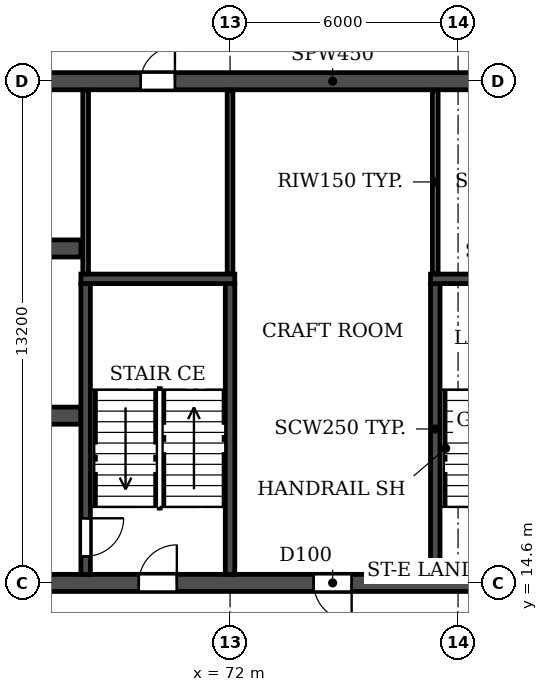
"""IFC4 building model, lengths in metres.
Left out: names, types, materials, properties, quantities, classifications, styles, units other than length and angle.
Written with IfcOpenShell. Run it as: python <this file> out.ifc"""

import sys

from ifc_helpers import new_model, si_unit, direction, frame, frame_2d, origin, place, context, subcontext, project, spatial, rectangle, extrude, element, fill, save


model = new_model("IFC4")
c1 = context("Model", 3, precision=1e-05, world=origin(), true_north=direction((0.0, 1.0)))
c2 = subcontext(c1, "Body", "Model", "MODEL_VIEW")
j1 = project(units=[si_unit("LENGTHUNIT", "METRE"), si_unit("PLANEANGLEUNIT", "RADIAN")], contexts=[c1])
p1 = place(None, origin())
s1 = spatial("IfcSite", under=j1, at=p1, CompositionType="ELEMENT")
p2 = place(p1, origin())
s2 = spatial("IfcBuilding", under=s1, at=p2, CompositionType="ELEMENT")
p3 = place(p2, frame((0.0, 0.0, 125.7)))
s3 = spatial("IfcBuildingStorey", under=s2, at=p3, CompositionType="ELEMENT", Elevation=125.7)
p4 = place(p3, frame((12.2, 14.6, 0.0), z_axis=(0.0, 0.0, 1.0), x_axis=(1.0, 0.0, 0.0)))
e1 = element("IfcWall", 1, at=p4, inside=s3, PredefinedType="SOLIDWALL", context=c2, shape_type="SweptSolid", body=[
    extrude(rectangle(XDim=77.6, YDim=0.45, at=frame_2d((38.8, 0.0))), origin(), (0.0, 0.0, 1.0), 3.07),
])
p5 = place(p4, frame((0.8, 0.0, 0.0)))
e2 = element("IfcOpeningElement", 2, at=p5, cuts=e1, PredefinedType="OPENING", context=c2, shape_type="SweptSolid", body=[
    extrude(rectangle(XDim=1.0, YDim=2.1, at=frame_2d((0.5, 1.05))), frame((0.0, 0.235, 0.0), z_axis=(0.0, -1.0, 0.0), x_axis=(1.0, 0.0, 0.0)), (0.0, 0.0, 1.0), 0.47),
])
p6 = place(p4, frame((3.8, 0.0, 0.0)))
e3 = element("IfcOpeningElement", 3, at=p6, cuts=e1, PredefinedType="OPENING", context=c2, shape_type="SweptSolid", body=[
    extrude(rectangle(XDim=1.0, YDim=2.1, at=frame_2d((0.5, 1.05))), frame((0.0, 0.235, 0.0), z_axis=(0.0, -1.0, 0.0), x_axis=(1.0, 0.0, 0.0)), (0.0, 0.0, 1.0), 0.47),
])
p7 = place(p4, frame((6.7, 0.0, 0.0)))
e4 = element("IfcOpeningElement", 4, at=p7, cuts=e1, PredefinedType="OPENING", context=c2, shape_type="SweptSolid", body=[
    extrude(rectangle(XDim=1.0, YDim=2.1, at=frame_2d((0.5, 1.05))), frame((0.0, 0.235, 0.0), z_axis=(0.0, -1.0, 0.0), x_axis=(1.0, 0.0, 0.0)), (0.0, 0.0, 1.0), 0.47),
])
p8 = place(p4, frame((14.6, 0.0, 0.0)))
e5 = element("IfcOpeningElement", 5, at=p8, cuts=e1, PredefinedType="OPENING", context=c2, shape_type="SweptSolid", body=[
    extrude(rectangle(XDim=1.0, YDim=2.1, at=frame_2d((0.5, 1.05))), frame((0.0, 0.235, 0.0), z_axis=(0.0, -1.0, 0.0), x_axis=(1.0, 0.0, 0.0)), (0.0, 0.0, 1.0), 0.47),
])
p9 = place(p4, frame((19.2, 0.0, 0.0)))
e6 = element("IfcOpeningElement", 6, at=p9, cuts=e1, PredefinedType="OPENING", context=c2, shape_type="SweptSolid", body=[
    extrude(rectangle(XDim=1.0, YDim=2.1, at=frame_2d((0.5, 1.05))), frame((0.0, 0.235, 0.0), z_axis=(0.0, -1.0, 0.0), x_axis=(1.0, 0.0, 0.0)), (0.0, 0.0, 1.0), 0.47),
])
p10 = place(p4, frame((30.5, 0.0, 0.0)))
e7 = element("IfcOpeningElement", 7, at=p10, cuts=e1, PredefinedType="OPENING", context=c2, shape_type="SweptSolid", body=[
    extrude(rectangle(XDim=1.0, YDim=2.1, at=frame_2d((0.5, 1.05))), frame((0.0, 0.235, 0.0), z_axis=(0.0, -1.0, 0.0), x_axis=(1.0, 0.0, 0.0)), (0.0, 0.0, 1.0), 0.47),
])
p11 = place(p4, frame((34.4, 0.0, 0.0)))
e8 = element("IfcOpeningElement", 8, at=p11, cuts=e1, PredefinedType="OPENING", context=c2, shape_type="SweptSolid", body=[
    extrude(rectangle(XDim=1.0, YDim=2.1, at=frame_2d((0.5, 1.05))), frame((0.0, 0.235, 0.0), z_axis=(0.0, -1.0, 0.0), x_axis=(1.0, 0.0, 0.0)), (0.0, 0.0, 1.0), 0.47),
])
p12 = place(p4, frame((38.3, 0.0, 0.0)))
e9 = element("IfcOpeningElement", 9, at=p12, cuts=e1, PredefinedType="OPENING", context=c2, shape_type="SweptSolid", body=[
    extrude(rectangle(XDim=1.0, YDim=2.1, at=frame_2d((0.5, 1.05))), frame((0.0, 0.235, 0.0), z_axis=(0.0, -1.0, 0.0), x_axis=(1.0, 0.0, 0.0)), (0.0, 0.0, 1.0), 0.47),
])
p13 = place(p4, frame((40.9, 0.0, 0.0)))
e10 = element("IfcOpeningElement", 10, at=p13, cuts=e1, PredefinedType="OPENING", context=c2, shape_type="SweptSolid", body=[
    extrude(rectangle(XDim=1.0, YDim=2.1, at=frame_2d((0.5, 1.05))), frame((0.0, 0.235, 0.0), z_axis=(0.0, -1.0, 0.0), x_axis=(1.0, 0.0, 0.0)), (0.0, 0.0, 1.0), 0.47),
])
p14 = place(p4, frame((44.8, 0.0, 0.0)))
e11 = element("IfcOpeningElement", 11, at=p14, cuts=e1, PredefinedType="OPENING", context=c2, shape_type="SweptSolid", body=[
    extrude(rectangle(XDim=1.0, YDim=2.1, at=frame_2d((0.5, 1.05))), frame((0.0, 0.235, 0.0), z_axis=(0.0, -1.0, 0.0), x_axis=(1.0, 0.0, 0.0)), (0.0, 0.0, 1.0), 0.47),
])
p15 = place(p4, frame((57.4, 0.0, 0.0)))
e12 = element("IfcOpeningElement", 12, at=p15, cuts=e1, PredefinedType="OPENING", context=c2, shape_type="SweptSolid", body=[
    extrude(rectangle(XDim=1.0, YDim=2.1, at=frame_2d((0.5, 1.05))), frame((0.0, 0.235, 0.0), z_axis=(0.0, -1.0, 0.0), x_axis=(1.0, 0.0, 0.0)), (0.0, 0.0, 1.0), 0.47),
])
p16 = place(p4, frame((62.0, 0.0, 0.0)))
e13 = element("IfcOpeningElement", 13, at=p16, cuts=e1, PredefinedType="OPENING", context=c2, shape_type="SweptSolid", body=[
    extrude(rectangle(XDim=1.0, YDim=2.1, at=frame_2d((0.5, 1.05))), frame((0.0, 0.235, 0.0), z_axis=(0.0, -1.0, 0.0), x_axis=(1.0, 0.0, 0.0)), (0.0, 0.0, 1.0), 0.47),
])
p17 = place(p4, frame((69.9, 0.0, 0.0)))
e14 = element("IfcOpeningElement", 14, at=p17, cuts=e1, PredefinedType="OPENING", context=c2, shape_type="SweptSolid", body=[
    extrude(rectangle(XDim=1.0, YDim=2.1, at=frame_2d((0.5, 1.05))), frame((0.0, 0.235, 0.0), z_axis=(0.0, -1.0, 0.0), x_axis=(1.0, 0.0, 0.0)), (0.0, 0.0, 1.0), 0.47),
])
p18 = place(p4, frame((72.8, 0.0, 0.0)))
e15 = element("IfcOpeningElement", 15, at=p18, cuts=e1, PredefinedType="OPENING", context=c2, shape_type="SweptSolid", body=[
    extrude(rectangle(XDim=1.0, YDim=2.1, at=frame_2d((0.5, 1.05))), frame((0.0, 0.235, 0.0), z_axis=(0.0, -1.0, 0.0), x_axis=(1.0, 0.0, 0.0)), (0.0, 0.0, 1.0), 0.47),
])
p19 = place(p4, frame((75.8, 0.0, 0.0)))
e16 = element("IfcOpeningElement", 16, at=p19, cuts=e1, PredefinedType="OPENING", context=c2, shape_type="SweptSolid", body=[
    extrude(rectangle(XDim=1.0, YDim=2.1, at=frame_2d((0.5, 1.05))), frame((0.0, 0.235, 0.0), z_axis=(0.0, -1.0, 0.0), x_axis=(1.0, 0.0, 0.0)), (0.0, 0.0, 1.0), 0.47),
])
p20 = place(p3, frame((12.2, 27.8, 0.0), z_axis=(0.0, 0.0, 1.0), x_axis=(1.0, 0.0, 0.0)))
e17 = element("IfcWall", 17, at=p20, inside=s3, PredefinedType="SOLIDWALL", context=c2, shape_type="SweptSolid", body=[
    extrude(rectangle(XDim=77.6, YDim=0.45, at=frame_2d((38.8, 0.0))), origin(), (0.0, 0.0, 1.0), 3.07),
])
p21 = place(p20, frame((0.8, 0.0, 0.0)))
e18 = element("IfcOpeningElement", 18, at=p21, cuts=e17, PredefinedType="OPENING", context=c2, shape_type="SweptSolid", body=[
    extrude(rectangle(XDim=1.0, YDim=2.1, at=frame_2d((0.5, 1.05))), frame((0.0, 0.235, 0.0), z_axis=(0.0, -1.0, 0.0), x_axis=(1.0, 0.0, 0.0)), (0.0, 0.0, 1.0), 0.47),
])
p22 = place(p20, frame((3.8, 0.0, 0.0)))
e19 = element("IfcOpeningElement", 19, at=p22, cuts=e17, PredefinedType="OPENING", context=c2, shape_type="SweptSolid", body=[
    extrude(rectangle(XDim=1.0, YDim=2.1, at=frame_2d((0.5, 1.05))), frame((0.0, 0.235, 0.0), z_axis=(0.0, -1.0, 0.0), x_axis=(1.0, 0.0, 0.0)), (0.0, 0.0, 1.0), 0.47),
])
p23 = place(p20, frame((6.7, 0.0, 0.0)))
e20 = element("IfcOpeningElement", 20, at=p23, cuts=e17, PredefinedType="OPENING", context=c2, shape_type="SweptSolid", body=[
    extrude(rectangle(XDim=1.0, YDim=2.1, at=frame_2d((0.5, 1.05))), frame((0.0, 0.235, 0.0), z_axis=(0.0, -1.0, 0.0), x_axis=(1.0, 0.0, 0.0)), (0.0, 0.0, 1.0), 0.47),
])
p24 = place(p20, frame((10.05, 0.0, 0.0)))
e21 = element("IfcOpeningElement", 21, at=p24, cuts=e17, PredefinedType="OPENING", context=c2, shape_type="SweptSolid", body=[
    extrude(rectangle(XDim=0.9, YDim=2.1, at=frame_2d((0.45, 1.05))), frame((0.0, 0.235, 0.0), z_axis=(0.0, -1.0, 0.0), x_axis=(1.0, 0.0, 0.0)), (0.0, 0.0, 1.0), 0.47),
])
p25 = place(p20, frame((19.25, 0.0, 0.0)))
e22 = element("IfcOpeningElement", 22, at=p25, cuts=e17, PredefinedType="OPENING", context=c2, shape_type="SweptSolid", body=[
    extrude(rectangle(XDim=0.9, YDim=2.1, at=frame_2d((0.45, 1.05))), frame((0.0, 0.235, 0.0), z_axis=(0.0, -1.0, 0.0), x_axis=(1.0, 0.0, 0.0)), (0.0, 0.0, 1.0), 0.47),
])
p26 = place(p20, frame((25.0, 0.0, 0.0)))
e23 = element("IfcOpeningElement", 23, at=p26, cuts=e17, PredefinedType="OPENING", context=c2, shape_type="SweptSolid", body=[
    extrude(rectangle(XDim=1.0, YDim=2.1, at=frame_2d((0.5, 1.05))), frame((0.0, 0.235, 0.0), z_axis=(0.0, -1.0, 0.0), x_axis=(1.0, 0.0, 0.0)), (0.0, 0.0, 1.0), 0.47),
])
p27 = place(p20, frame((30.2, 0.0, 0.0)))
e24 = element("IfcOpeningElement", 24, at=p27, cuts=e17, PredefinedType="OPENING", context=c2, shape_type="SweptSolid", body=[
    extrude(rectangle(XDim=1.0, YDim=2.1, at=frame_2d((0.5, 1.05))), frame((0.0, 0.235, 0.0), z_axis=(0.0, -1.0, 0.0), x_axis=(1.0, 0.0, 0.0)), (0.0, 0.0, 1.0), 0.47),
])
p28 = place(p20, frame((35.4, 0.0, 0.0)))
e25 = element("IfcOpeningElement", 25, at=p28, cuts=e17, PredefinedType="OPENING", context=c2, shape_type="SweptSolid", body=[
    extrude(rectangle(XDim=1.0, YDim=2.1, at=frame_2d((0.5, 1.05))), frame((0.0, 0.235, 0.0), z_axis=(0.0, -1.0, 0.0), x_axis=(1.0, 0.0, 0.0)), (0.0, 0.0, 1.0), 0.47),
])
p29 = place(p20, frame((38.3, 0.0, 0.0)))
e26 = element("IfcOpeningElement", 26, at=p29, cuts=e17, PredefinedType="OPENING", context=c2, shape_type="SweptSolid", body=[
    extrude(rectangle(XDim=1.0, YDim=2.1, at=frame_2d((0.5, 1.05))), frame((0.0, 0.235, 0.0), z_axis=(0.0, -1.0, 0.0), x_axis=(1.0, 0.0, 0.0)), (0.0, 0.0, 1.0), 0.47),
])
p30 = place(p20, frame((42.5, 0.0, 0.0)))
e27 = element("IfcOpeningElement", 27, at=p30, cuts=e17, PredefinedType="OPENING", context=c2, shape_type="SweptSolid", body=[
    extrude(rectangle(XDim=1.0, YDim=2.1, at=frame_2d((0.5, 1.05))), frame((0.0, 0.235, 0.0), z_axis=(0.0, -1.0, 0.0), x_axis=(1.0, 0.0, 0.0)), (0.0, 0.0, 1.0), 0.47),
])
p31 = place(p20, frame((46.4, 0.0, 0.0)))
e28 = element("IfcOpeningElement", 28, at=p31, cuts=e17, PredefinedType="OPENING", context=c2, shape_type="SweptSolid", body=[
    extrude(rectangle(XDim=1.0, YDim=2.1, at=frame_2d((0.5, 1.05))), frame((0.0, 0.235, 0.0), z_axis=(0.0, -1.0, 0.0), x_axis=(1.0, 0.0, 0.0)), (0.0, 0.0, 1.0), 0.47),
])
p32 = place(p20, frame((49.0, 0.0, 0.0)))
e29 = element("IfcOpeningElement", 29, at=p32, cuts=e17, PredefinedType="OPENING", context=c2, shape_type="SweptSolid", body=[
    extrude(rectangle(XDim=1.0, YDim=2.1, at=frame_2d((0.5, 1.05))), frame((0.0, 0.235, 0.0), z_axis=(0.0, -1.0, 0.0), x_axis=(1.0, 0.0, 0.0)), (0.0, 0.0, 1.0), 0.47),
])
p33 = place(p20, frame((52.65, 0.0, 0.0)))
e30 = element("IfcOpeningElement", 30, at=p33, cuts=e17, PredefinedType="OPENING", context=c2, shape_type="SweptSolid", body=[
    extrude(rectangle(XDim=1.5, YDim=2.1, at=frame_2d((0.75, 1.05))), frame((0.0, 0.235, 0.0), z_axis=(0.0, -1.0, 0.0), x_axis=(1.0, 0.0, 0.0)), (0.0, 0.0, 1.0), 0.47),
])
p34 = place(p20, frame((57.45, 0.0, 0.0)))
e31 = element("IfcOpeningElement", 31, at=p34, cuts=e17, PredefinedType="OPENING", context=c2, shape_type="SweptSolid", body=[
    extrude(rectangle(XDim=0.9, YDim=2.1, at=frame_2d((0.45, 1.05))), frame((0.0, 0.235, 0.0), z_axis=(0.0, -1.0, 0.0), x_axis=(1.0, 0.0, 0.0)), (0.0, 0.0, 1.0), 0.47),
])
p35 = place(p20, frame((66.65, 0.0, 0.0)))
e32 = element("IfcOpeningElement", 32, at=p35, cuts=e17, PredefinedType="OPENING", context=c2, shape_type="SweptSolid", body=[
    extrude(rectangle(XDim=0.9, YDim=2.1, at=frame_2d((0.45, 1.05))), frame((0.0, 0.235, 0.0), z_axis=(0.0, -1.0, 0.0), x_axis=(1.0, 0.0, 0.0)), (0.0, 0.0, 1.0), 0.47),
])
p36 = place(p20, frame((69.9, 0.0, 0.0)))
e33 = element("IfcOpeningElement", 33, at=p36, cuts=e17, PredefinedType="OPENING", context=c2, shape_type="SweptSolid", body=[
    extrude(rectangle(XDim=1.0, YDim=2.1, at=frame_2d((0.5, 1.05))), frame((0.0, 0.235, 0.0), z_axis=(0.0, -1.0, 0.0), x_axis=(1.0, 0.0, 0.0)), (0.0, 0.0, 1.0), 0.47),
])
p37 = place(p20, frame((72.8, 0.0, 0.0)))
e34 = element("IfcOpeningElement", 34, at=p37, cuts=e17, PredefinedType="OPENING", context=c2, shape_type="SweptSolid", body=[
    extrude(rectangle(XDim=1.0, YDim=2.1, at=frame_2d((0.5, 1.05))), frame((0.0, 0.235, 0.0), z_axis=(0.0, -1.0, 0.0), x_axis=(1.0, 0.0, 0.0)), (0.0, 0.0, 1.0), 0.47),
])
p38 = place(p20, frame((75.8, 0.0, 0.0)))
e35 = element("IfcOpeningElement", 35, at=p38, cuts=e17, PredefinedType="OPENING", context=c2, shape_type="SweptSolid", body=[
    extrude(rectangle(XDim=1.0, YDim=2.1, at=frame_2d((0.5, 1.05))), frame((0.0, 0.235, 0.0), z_axis=(0.0, -1.0, 0.0), x_axis=(1.0, 0.0, 0.0)), (0.0, 0.0, 1.0), 0.47),
])
p39 = place(p3, frame((33.925, 19.0, 0.0), z_axis=(0.0, 0.0, 1.0), x_axis=(1.0, 0.0, 0.0)))
e36 = element("IfcWall", 36, at=p39, inside=s3, PredefinedType="SOLIDWALL", context=c2, shape_type="SweptSolid", body=[
    extrude(rectangle(XDim=34.15, YDim=0.45, at=frame_2d((17.075, 0.0))), origin(), (0.0, 0.0, 1.0), 3.07),
])
p40 = place(p39, frame((16.175, 0.0, 0.0)))
e37 = element("IfcOpeningElement", 37, at=p40, cuts=e36, PredefinedType="OPENING", context=c2, shape_type="SweptSolid", body=[
    extrude(rectangle(XDim=1.8, YDim=2.1, at=frame_2d((0.9, 1.05))), frame((0.0, 0.235, 0.0), z_axis=(0.0, -1.0, 0.0), x_axis=(1.0, 0.0, 0.0)), (0.0, 0.0, 1.0), 0.47),
])
p41 = place(p39, frame((1.525, 0.0, 0.0)))
e38 = element("IfcOpeningElement", 38, at=p41, cuts=e36, PredefinedType="OPENING", context=c2, shape_type="SweptSolid", body=[
    extrude(rectangle(XDim=1.8, YDim=2.1, at=frame_2d((0.9, 1.05))), frame((0.0, 0.235, 0.0), z_axis=(0.0, -1.0, 0.0), x_axis=(1.0, 0.0, 0.0)), (0.0, 0.0, 1.0), 0.47),
])
p42 = place(p39, frame((30.825, 0.0, 0.0)))
e39 = element("IfcOpeningElement", 39, at=p42, cuts=e36, PredefinedType="OPENING", context=c2, shape_type="SweptSolid", body=[
    extrude(rectangle(XDim=1.8, YDim=2.1, at=frame_2d((0.9, 1.05))), frame((0.0, 0.235, 0.0), z_axis=(0.0, -1.0, 0.0), x_axis=(1.0, 0.0, 0.0)), (0.0, 0.0, 1.0), 0.47),
])
p43 = place(p3, frame((33.925, 23.4, 0.0), z_axis=(0.0, 0.0, 1.0), x_axis=(1.0, 0.0, 0.0)))
e40 = element("IfcWall", 40, at=p43, inside=s3, PredefinedType="SOLIDWALL", context=c2, shape_type="SweptSolid", body=[
    extrude(rectangle(XDim=34.15, YDim=0.45, at=frame_2d((17.075, 0.0))), origin(), (0.0, 0.0, 1.0), 3.07),
])
p44 = place(p43, frame((16.175, 0.0, 0.0)))
e41 = element("IfcOpeningElement", 41, at=p44, cuts=e40, PredefinedType="OPENING", context=c2, shape_type="SweptSolid", body=[
    extrude(rectangle(XDim=1.8, YDim=2.1, at=frame_2d((0.9, 1.05))), frame((0.0, 0.235, 0.0), z_axis=(0.0, -1.0, 0.0), x_axis=(1.0, 0.0, 0.0)), (0.0, 0.0, 1.0), 0.47),
])
p45 = place(p43, frame((0.625, 0.0, 0.0)))
e42 = element("IfcOpeningElement", 42, at=p45, cuts=e40, PredefinedType="OPENING", context=c2, shape_type="SweptSolid", body=[
    extrude(rectangle(XDim=1.1, YDim=2.1, at=frame_2d((0.55, 1.05))), frame((0.0, 0.235, 0.0), z_axis=(0.0, -1.0, 0.0), x_axis=(1.0, 0.0, 0.0)), (0.0, 0.0, 1.0), 0.47),
])
p46 = place(p43, frame((3.225, 0.0, 0.0)))
e43 = element("IfcOpeningElement", 43, at=p46, cuts=e40, PredefinedType="OPENING", context=c2, shape_type="SweptSolid", body=[
    extrude(rectangle(XDim=1.1, YDim=2.1, at=frame_2d((0.55, 1.05))), frame((0.0, 0.235, 0.0), z_axis=(0.0, -1.0, 0.0), x_axis=(1.0, 0.0, 0.0)), (0.0, 0.0, 1.0), 0.47),
])
p47 = place(p43, frame((5.825, 0.0, 0.0)))
e44 = element("IfcOpeningElement", 44, at=p47, cuts=e40, PredefinedType="OPENING", context=c2, shape_type="SweptSolid", body=[
    extrude(rectangle(XDim=1.1, YDim=2.1, at=frame_2d((0.55, 1.05))), frame((0.0, 0.235, 0.0), z_axis=(0.0, -1.0, 0.0), x_axis=(1.0, 0.0, 0.0)), (0.0, 0.0, 1.0), 0.47),
])
p48 = place(p43, frame((8.425, 0.0, 0.0)))
e45 = element("IfcOpeningElement", 45, at=p48, cuts=e40, PredefinedType="OPENING", context=c2, shape_type="SweptSolid", body=[
    extrude(rectangle(XDim=1.1, YDim=2.1, at=frame_2d((0.55, 1.05))), frame((0.0, 0.235, 0.0), z_axis=(0.0, -1.0, 0.0), x_axis=(1.0, 0.0, 0.0)), (0.0, 0.0, 1.0), 0.47),
])
p49 = place(p43, frame((11.025, 0.0, 0.0)))
e46 = element("IfcOpeningElement", 46, at=p49, cuts=e40, PredefinedType="OPENING", context=c2, shape_type="SweptSolid", body=[
    extrude(rectangle(XDim=1.1, YDim=2.1, at=frame_2d((0.55, 1.05))), frame((0.0, 0.235, 0.0), z_axis=(0.0, -1.0, 0.0), x_axis=(1.0, 0.0, 0.0)), (0.0, 0.0, 1.0), 0.47),
])
p50 = place(p43, frame((13.625, 0.0, 0.0)))
e47 = element("IfcOpeningElement", 47, at=p50, cuts=e40, PredefinedType="OPENING", context=c2, shape_type="SweptSolid", body=[
    extrude(rectangle(XDim=1.1, YDim=2.1, at=frame_2d((0.55, 1.05))), frame((0.0, 0.235, 0.0), z_axis=(0.0, -1.0, 0.0), x_axis=(1.0, 0.0, 0.0)), (0.0, 0.0, 1.0), 0.47),
])
p51 = place(p43, frame((27.225, 0.0, 0.0)))
e48 = element("IfcOpeningElement", 48, at=p51, cuts=e40, PredefinedType="OPENING", context=c2, shape_type="SweptSolid", body=[
    extrude(rectangle(XDim=1.1, YDim=2.1, at=frame_2d((0.55, 1.05))), frame((0.0, 0.235, 0.0), z_axis=(0.0, -1.0, 0.0), x_axis=(1.0, 0.0, 0.0)), (0.0, 0.0, 1.0), 0.47),
])
p52 = place(p3, frame((68.2, 14.825, 0.0), z_axis=(0.0, 0.0, 1.0), x_axis=(0.0, 1.0, 0.0)))
e49 = element("IfcWall", 49, at=p52, inside=s3, PredefinedType="SOLIDWALL", context=c2, shape_type="SweptSolid", body=[
    extrude(rectangle(XDim=7.65, YDim=0.25, at=frame_2d((3.825, 0.0))), origin(), (0.0, 0.0, 1.0), 3.07),
])
p53 = place(p52, frame((0.475, 0.0, 0.0)))
e50 = element("IfcOpeningElement", 50, at=p53, cuts=e49, PredefinedType="OPENING", context=c2, shape_type="SweptSolid", body=[
    extrude(rectangle(XDim=1.0, YDim=2.1, at=frame_2d((0.5, 1.05))), frame((0.0, 0.135, 0.0), z_axis=(0.0, -1.0, 0.0), x_axis=(1.0, 0.0, 0.0)), (0.0, 0.0, 1.0), 0.27),
])
p54 = place(p3, frame((72.0, 14.825, 0.0), z_axis=(0.0, 0.0, 1.0), x_axis=(0.0, 1.0, 0.0)))
e51 = element("IfcWall", 51, at=p54, inside=s3, PredefinedType="SOLIDWALL", context=c2, shape_type="SweptSolid", body=[
    extrude(rectangle(XDim=7.65, YDim=0.25, at=frame_2d((3.825, 0.0))), origin(), (0.0, 0.0, 1.0), 3.07),
])
p55 = place(p3, frame((68.075, 22.6, 0.0), z_axis=(0.0, 0.0, 1.0), x_axis=(1.0, 0.0, 0.0)))
e52 = element("IfcWall", 52, at=p55, inside=s3, PredefinedType="SOLIDWALL", context=c2, shape_type="SweptSolid", body=[
    extrude(rectangle(XDim=4.05, YDim=0.25, at=frame_2d((2.025, 0.0))), origin(), (0.0, 0.0, 1.0), 3.07),
])
p56 = place(p3, frame((77.4, 14.825, 0.0), z_axis=(0.0, 0.0, 1.0), x_axis=(0.0, 1.0, 0.0)))
e53 = element("IfcWall", 53, at=p56, inside=s3, PredefinedType="SOLIDWALL", context=c2, shape_type="SweptSolid", body=[
    extrude(rectangle(XDim=7.65, YDim=0.25, at=frame_2d((3.825, 0.0))), origin(), (0.0, 0.0, 1.0), 3.07),
])
p57 = place(p3, frame((77.275, 22.6, 0.0), z_axis=(0.0, 0.0, 1.0), x_axis=(1.0, 0.0, 0.0)))
e54 = element("IfcWall", 54, at=p57, inside=s3, PredefinedType="SOLIDWALL", context=c2, shape_type="SweptSolid", body=[
    extrude(rectangle(XDim=4.05, YDim=0.25, at=frame_2d((2.025, 0.0))), origin(), (0.0, 0.0, 1.0), 3.07),
])
for number, where, z_axis, x_axis in (
    (55, (68.2, 22.735, 0.0), (0.0, 0.0, 1.0), (0.0, 1.0, 0.0)),
    (56, (72.0, 22.735, 0.0), (0.0, 0.0, 1.0), (0.0, 1.0, 0.0)),
    (57, (77.4, 22.735, 0.0), (0.0, 0.0, 1.0), (0.0, 1.0, 0.0)),
):
    element("IfcWall", number, at=place(p3, frame(where, z_axis=z_axis, x_axis=x_axis)), inside=s3, PredefinedType="PARTITIONING", context=c2, shape_type="SweptSolid", body=[
        extrude(rectangle(XDim=4.83, YDim=0.15, at=frame_2d((2.415, 0.0))), origin(), (0.0, 0.0, 1.0), 3.07),
    ])
p58 = place(p34, origin())
e58 = element("IfcDoor", 58, at=p58, inside=s3, OperationType="SINGLE_SWING_RIGHT", PredefinedType="DOOR", context=c2, shape_type="SweptSolid", body=[
    extrude(rectangle(XDim=0.9, YDim=2.1, at=frame_2d((0.45, 1.05))), frame((0.0, 0.025, 0.0), z_axis=(0.0, -1.0, 0.0), x_axis=(1.0, 0.0, 0.0)), (0.0, 0.0, 1.0), 0.05),
])
fill(e31, e58)
p59 = place(p15, origin())
e59 = element("IfcDoor", 59, at=p59, inside=s3, OperationType="SINGLE_SWING_RIGHT", PredefinedType="DOOR", context=c2, shape_type="SweptSolid", body=[
    extrude(rectangle(XDim=1.0, YDim=2.1, at=frame_2d((0.5, 1.05))), frame((0.0, 0.025, 0.0), z_axis=(0.0, -1.0, 0.0), x_axis=(1.0, 0.0, 0.0)), (0.0, 0.0, 1.0), 0.05),
])
fill(e12, e59)
p60 = place(p16, frame((1.0, 0.0, 0.0), z_axis=(0.0, 0.0, 1.0), x_axis=(-1.0, 0.0, 0.0)))
e60 = element("IfcDoor", 60, at=p60, inside=s3, OperationType="SINGLE_SWING_LEFT", PredefinedType="DOOR", context=c2, shape_type="SweptSolid", body=[
    extrude(rectangle(XDim=1.0, YDim=2.1, at=frame_2d((0.5, 1.05))), frame((0.0, 0.025, 0.0), z_axis=(0.0, -1.0, 0.0), x_axis=(1.0, 0.0, 0.0)), (0.0, 0.0, 1.0), 0.05),
])
fill(e13, e60)
p61 = place(p53, frame((1.0, 0.0, 0.0), z_axis=(0.0, 0.0, 1.0), x_axis=(-1.0, 0.0, 0.0)))
e61 = element("IfcDoor", 61, at=p61, inside=s3, OperationType="SINGLE_SWING_LEFT", PredefinedType="DOOR", context=c2, shape_type="SweptSolid", body=[
    extrude(rectangle(XDim=1.0, YDim=2.1, at=frame_2d((0.5, 1.05))), frame((0.0, 0.025, 0.0), z_axis=(0.0, -1.0, 0.0), x_axis=(1.0, 0.0, 0.0)), (0.0, 0.0, 1.0), 0.05),
])
fill(e50, e61)
save(model, sys.argv[1])
